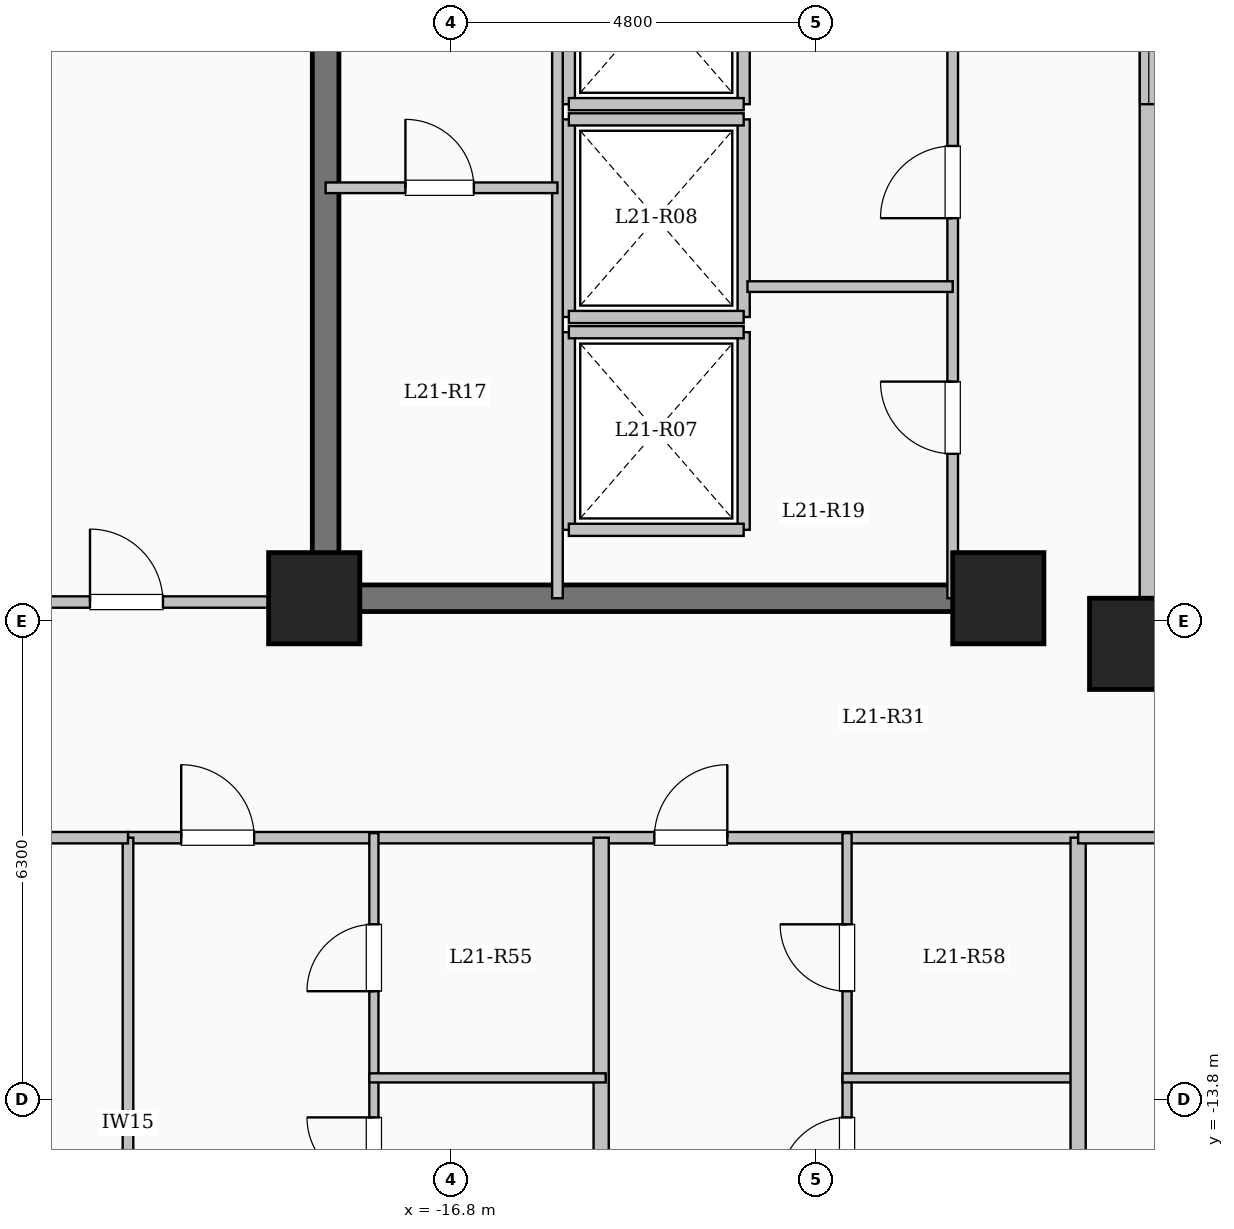
"""IFC4 building model, lengths in metres.
Left out: names, types, materials, properties, quantities, classifications, styles, units other than length and angle.
Written with IfcOpenShell. Run it as: python <this file> out.ifc"""

import sys

from ifc_helpers import new_model, si_unit, direction, frame, frame_2d, origin, origin_2d, place, context, subcontext, project, spatial, rectangle, extrude, element, fill, save


model = new_model("IFC4")
c1 = context("Model", 3, precision=1e-05, world=origin(), true_north=direction((0.0, 1.0)))
c2 = subcontext(c1, "Body", "Model", "MODEL_VIEW")
j1 = project(units=[si_unit("LENGTHUNIT", "METRE"), si_unit("PLANEANGLEUNIT", "RADIAN")], contexts=[c1])
p1 = place(None, origin())
s1 = spatial("IfcSite", under=j1, at=p1, CompositionType="ELEMENT")
p2 = place(p1, origin())
s2 = spatial("IfcBuilding", under=s1, at=p2, CompositionType="ELEMENT")
p3 = place(p2, frame((0.0, 0.0, 81.65)))
s3 = spatial("IfcBuildingStorey", under=s2, at=p3, CompositionType="ELEMENT", Elevation=81.65)
for number, where, z_axis, x_axis in (
    (1, (-7.8, -7.8, 0.0), (0.0, 0.0, 1.0), (1.0, 0.0, 0.0)),
    (2, (-9.6, -7.2, 0.0), (0.0, 0.0, 1.0), (1.0, 0.0, 0.0)),
    (3, (-18.6, -7.2, 0.0), (0.0, 0.0, 1.0), (1.0, 0.0, 0.0)),
):
    element("IfcColumn", number, at=place(p3, frame(where, z_axis=z_axis, x_axis=x_axis)), inside=s3, PredefinedType="COLUMN", context=c2, shape_type="SweptSolid", body=[
        extrude(rectangle(XDim=1.2, YDim=1.2, at=origin_2d()), origin(), (0.0, 0.0, 1.0), 3.35),
    ])
p4 = place(p3, frame((-7.62, -7.62, 0.0), z_axis=(0.0, 0.0, 1.0), x_axis=(1.0, 0.0, 0.0)))
e4 = element("IfcWall", 4, at=p4, inside=s3, PredefinedType="SOLIDWALL", context=c2, shape_type="SweptSolid", body=[
    extrude(rectangle(XDim=15.24, YDim=0.24, at=frame_2d((7.62, 0.0))), origin(), (0.0, 0.0, 1.0), 3.1),
])
p5 = place(p4, frame((6.92, 0.0, 0.95)))
e5 = element("IfcOpeningElement", 5, at=p5, cuts=e4, PredefinedType="OPENING", context=c2, shape_type="SweptSolid", body=[
    extrude(rectangle(XDim=1.4, YDim=1.5, at=frame_2d((0.7, 0.75))), frame((0.0, 0.13, 0.0), z_axis=(0.0, -1.0, 0.0), x_axis=(1.0, 0.0, 0.0)), (0.0, 0.0, 1.0), 0.26),
])
p6 = place(p3, frame((-7.62, 7.62, 0.0), z_axis=(0.0, 0.0, 1.0), x_axis=(0.0, -1.0, 0.0)))
e6 = element("IfcWall", 6, at=p6, inside=s3, PredefinedType="SOLIDWALL", context=c2, shape_type="SweptSolid", body=[
    extrude(rectangle(XDim=15.24, YDim=0.24, at=frame_2d((7.62, 0.0))), origin(), (0.0, 0.0, 1.0), 3.1),
])
p7 = place(p6, frame((6.92, 0.0, 0.95)))
e7 = element("IfcOpeningElement", 7, at=p7, cuts=e6, PredefinedType="OPENING", context=c2, shape_type="SweptSolid", body=[
    extrude(rectangle(XDim=1.4, YDim=1.5, at=frame_2d((0.7, 0.75))), frame((0.0, 0.13, 0.0), z_axis=(0.0, -1.0, 0.0), x_axis=(1.0, 0.0, 0.0)), (0.0, 0.0, 1.0), 0.26),
])
for number, where, z_axis, x_axis in (
    (8, (-15.25, -6.3, 0.0), (0.0, 0.0, 1.0), (0.0, 1.0, 0.0)),
    (9, (-12.95, -6.3, 0.0), (0.0, 0.0, 1.0), (0.0, 1.0, 0.0)),
):
    element("IfcWall", number, at=place(p3, frame(where, z_axis=z_axis, x_axis=x_axis)), inside=s3, PredefinedType="SOLIDWALL", context=c2, shape_type="SweptSolid", body=[
        extrude(rectangle(XDim=2.6, YDim=0.16, at=frame_2d((1.3, 0.0))), origin(), (0.0, 0.0, 1.0), 3.1),
    ])
for number, where, z_axis, x_axis in (
    (10, (-15.25, -6.3, 0.0), (0.0, 0.0, 1.0), (1.0, 0.0, 0.0)),
    (11, (-15.25, -3.7, 0.0), (0.0, 0.0, 1.0), (1.0, 0.0, 0.0)),
):
    element("IfcWall", number, at=place(p3, frame(where, z_axis=z_axis, x_axis=x_axis)), inside=s3, PredefinedType="SOLIDWALL", context=c2, shape_type="SweptSolid", body=[
        extrude(rectangle(XDim=2.3, YDim=0.16, at=frame_2d((1.15, 0.0))), origin(), (0.0, 0.0, 1.0), 3.1),
    ])
for number, where, z_axis, x_axis in (
    (12, (-15.25, -3.5, 0.0), (0.0, 0.0, 1.0), (0.0, 1.0, 0.0)),
    (13, (-12.95, -3.5, 0.0), (0.0, 0.0, 1.0), (0.0, 1.0, 0.0)),
):
    element("IfcWall", number, at=place(p3, frame(where, z_axis=z_axis, x_axis=x_axis)), inside=s3, PredefinedType="SOLIDWALL", context=c2, shape_type="SweptSolid", body=[
        extrude(rectangle(XDim=2.6, YDim=0.16, at=frame_2d((1.3, 0.0))), origin(), (0.0, 0.0, 1.0), 3.1),
    ])
for number, where, z_axis, x_axis in (
    (14, (-15.25, -3.5, 0.0), (0.0, 0.0, 1.0), (1.0, 0.0, 0.0)),
    (15, (-15.25, -0.9, 0.0), (0.0, 0.0, 1.0), (1.0, 0.0, 0.0)),
):
    element("IfcWall", number, at=place(p3, frame(where, z_axis=z_axis, x_axis=x_axis)), inside=s3, PredefinedType="SOLIDWALL", context=c2, shape_type="SweptSolid", body=[
        extrude(rectangle(XDim=2.3, YDim=0.16, at=frame_2d((1.15, 0.0))), origin(), (0.0, 0.0, 1.0), 3.1),
    ])
for number, where, z_axis, x_axis in (
    (16, (-15.25, -0.7, 0.0), (0.0, 0.0, 1.0), (0.0, 1.0, 0.0)),
    (17, (-12.95, -0.7, 0.0), (0.0, 0.0, 1.0), (0.0, 1.0, 0.0)),
):
    element("IfcWall", number, at=place(p3, frame(where, z_axis=z_axis, x_axis=x_axis)), inside=s3, PredefinedType="SOLIDWALL", context=c2, shape_type="SweptSolid", body=[
        extrude(rectangle(XDim=2.6, YDim=0.16, at=frame_2d((1.3, 0.0))), origin(), (0.0, 0.0, 1.0), 3.1),
    ])
p8 = place(p3, frame((-15.25, -0.7, 0.0), z_axis=(0.0, 0.0, 1.0), x_axis=(1.0, 0.0, 0.0)))
e18 = element("IfcWall", 18, at=p8, inside=s3, PredefinedType="SOLIDWALL", context=c2, shape_type="SweptSolid", body=[
    extrude(rectangle(XDim=2.3, YDim=0.16, at=frame_2d((1.15, 0.0))), origin(), (0.0, 0.0, 1.0), 3.1),
])
p9 = place(p3, frame((-18.45, -7.375, 0.0), z_axis=(0.0, 0.0, 1.0), x_axis=(0.0, 1.0, 0.0)))
e19 = element("IfcWall", 19, at=p9, inside=s3, PredefinedType="SHEAR", context=c2, shape_type="SweptSolid", body=[
    extrude(rectangle(XDim=14.05, YDim=0.35, at=frame_2d((7.025, 0.0))), origin(), (0.0, 0.0, 1.0), 3.35),
])
p10 = place(p3, frame((-18.625, -7.2, 0.0), z_axis=(0.0, 0.0, 1.0), x_axis=(1.0, 0.0, 0.0)))
e20 = element("IfcWall", 20, at=p10, inside=s3, PredefinedType="SHEAR", context=c2, shape_type="SweptSolid", body=[
    extrude(rectangle(XDim=8.55, YDim=0.35, at=frame_2d((4.275, 0.0))), origin(), (0.0, 0.0, 1.0), 3.35),
])
p11 = place(p3, frame((-15.4, -7.2, 0.0), z_axis=(0.0, 0.0, 1.0), x_axis=(0.0, 1.0, 0.0)))
e21 = element("IfcWall", 21, at=p11, inside=s3, PredefinedType="PARTITIONING", context=c2, shape_type="SweptSolid", body=[
    extrude(rectangle(XDim=10.45, YDim=0.14, at=frame_2d((5.225, 0.0))), origin(), (0.0, 0.0, 1.0), 3.1),
])
p12 = place(p11, frame((9.25, 0.0, 0.0)))
e22 = element("IfcOpeningElement", 22, at=p12, cuts=e21, PredefinedType="OPENING", context=c2, shape_type="SweptSolid", body=[
    extrude(rectangle(XDim=0.9, YDim=2.08, at=frame_2d((0.45, 1.04))), frame((0.0, 0.08, 0.0), z_axis=(0.0, -1.0, 0.0), x_axis=(1.0, 0.0, 0.0)), (0.0, 0.0, 1.0), 0.16),
])
p13 = place(p3, frame((-18.45, -1.8, 0.0), z_axis=(0.0, 0.0, 1.0), x_axis=(1.0, 0.0, 0.0)))
e23 = element("IfcWall", 23, at=p13, inside=s3, PredefinedType="PARTITIONING", context=c2, shape_type="SweptSolid", body=[
    extrude(rectangle(XDim=3.05, YDim=0.14, at=frame_2d((1.525, 0.0))), origin(), (0.0, 0.0, 1.0), 3.1),
])
p14 = place(p13, frame((1.05, 0.0, 0.0)))
e24 = element("IfcOpeningElement", 24, at=p14, cuts=e23, PredefinedType="OPENING", context=c2, shape_type="SweptSolid", body=[
    extrude(rectangle(XDim=0.9, YDim=2.08, at=frame_2d((0.45, 1.04))), frame((0.0, 0.08, 0.0), z_axis=(0.0, -1.0, 0.0), x_axis=(1.0, 0.0, 0.0)), (0.0, 0.0, 1.0), 0.16),
])
p15 = place(p3, frame((-10.2, -7.2, 0.0), z_axis=(0.0, 0.0, 1.0), x_axis=(0.0, 1.0, 0.0)))
e25 = element("IfcWall", 25, at=p15, inside=s3, PredefinedType="PARTITIONING", context=c2, shape_type="SweptSolid", body=[
    extrude(rectangle(XDim=9.12, YDim=0.14, at=frame_2d((4.56, 0.0))), origin(), (0.0, 0.0, 1.0), 3.1),
])
p16 = place(p15, frame((1.9, 0.0, 0.0)))
e26 = element("IfcOpeningElement", 26, at=p16, cuts=e25, PredefinedType="OPENING", context=c2, shape_type="SweptSolid", body=[
    extrude(rectangle(XDim=0.95, YDim=2.12, at=frame_2d((0.475, 1.06))), frame((0.0, 0.08, 0.0), z_axis=(0.0, -1.0, 0.0), x_axis=(1.0, 0.0, 0.0)), (0.0, 0.0, 1.0), 0.16),
])
p17 = place(p15, frame((5.0, 0.0, 0.0)))
e27 = element("IfcOpeningElement", 27, at=p17, cuts=e25, PredefinedType="OPENING", context=c2, shape_type="SweptSolid", body=[
    extrude(rectangle(XDim=0.95, YDim=2.12, at=frame_2d((0.475, 1.06))), frame((0.0, 0.08, 0.0), z_axis=(0.0, -1.0, 0.0), x_axis=(1.0, 0.0, 0.0)), (0.0, 0.0, 1.0), 0.16),
])
p18 = place(p3, frame((-12.9, -3.1, 0.0), z_axis=(0.0, 0.0, 1.0), x_axis=(1.0, 0.0, 0.0)))
e28 = element("IfcWall", 28, at=p18, inside=s3, PredefinedType="PARTITIONING", context=c2, shape_type="SweptSolid", body=[
    extrude(rectangle(XDim=2.7, YDim=0.14, at=frame_2d((1.35, 0.0))), origin(), (0.0, 0.0, 1.0), 3.1),
])
p19 = place(p3, frame((-21.05, -10.35, 0.0), z_axis=(0.0, 0.0, 1.0), x_axis=(1.0, 0.0, 0.0)))
e29 = element("IfcWall", 29, at=p19, inside=s3, PredefinedType="PARTITIONING", context=c2, shape_type="SweptSolid", body=[
    extrude(rectangle(XDim=12.5, YDim=0.15, at=frame_2d((6.25, 0.0))), origin(), (0.0, 0.0, 1.0), 3.1),
])
p20 = place(p19, frame((0.7, 0.0, 0.0)))
e30 = element("IfcOpeningElement", 30, at=p20, cuts=e29, PredefinedType="OPENING", context=c2, shape_type="SweptSolid", body=[
    extrude(rectangle(XDim=0.96, YDim=2.15, at=frame_2d((0.48, 1.075))), frame((0.0, 0.085, 0.0), z_axis=(0.0, -1.0, 0.0), x_axis=(1.0, 0.0, 0.0)), (0.0, 0.0, 1.0), 0.17),
])
p21 = place(p19, frame((6.925, 0.0, 0.0)))
e31 = element("IfcOpeningElement", 31, at=p21, cuts=e29, PredefinedType="OPENING", context=c2, shape_type="SweptSolid", body=[
    extrude(rectangle(XDim=0.96, YDim=2.15, at=frame_2d((0.48, 1.075))), frame((0.0, 0.085, 0.0), z_axis=(0.0, -1.0, 0.0), x_axis=(1.0, 0.0, 0.0)), (0.0, 0.0, 1.0), 0.17),
])
p22 = place(p3, frame((-14.825, -22.1, 0.0), z_axis=(0.0, 0.0, 1.0), x_axis=(0.0, 1.0, 0.0)))
e32 = element("IfcWall", 32, at=p22, inside=s3, PredefinedType="SOLIDWALL", context=c2, shape_type="SweptSolid", body=[
    extrude(rectangle(XDim=11.75, YDim=0.2, at=frame_2d((5.875, 0.0))), origin(), (0.0, 0.0, 1.0), 2.435),
])
p23 = place(p3, frame((-17.815, -22.1, 0.0), z_axis=(0.0, 0.0, 1.0), x_axis=(0.0, 1.0, 0.0)))
e33 = element("IfcWall", 33, at=p23, inside=s3, PredefinedType="PARTITIONING", context=c2, shape_type="SweptSolid", body=[
    extrude(rectangle(XDim=8.59, YDim=0.12, at=frame_2d((4.295, 0.0))), origin(), (0.0, 0.0, 1.0), 3.1),
])
p24 = place(p23, frame((7.19, 0.0, 0.0)))
e34 = element("IfcOpeningElement", 34, at=p24, cuts=e33, PredefinedType="OPENING", context=c2, shape_type="SweptSolid", body=[
    extrude(rectangle(XDim=0.88, YDim=2.1, at=frame_2d((0.44, 1.05))), frame((0.0, 0.07, 0.0), z_axis=(0.0, -1.0, 0.0), x_axis=(1.0, 0.0, 0.0)), (0.0, 0.0, 1.0), 0.14),
])
p25 = place(p3, frame((-17.815, -13.51, 0.0), z_axis=(0.0, 0.0, 1.0), x_axis=(0.0, 1.0, 0.0)))
e35 = element("IfcWall", 35, at=p25, inside=s3, PredefinedType="PARTITIONING", context=c2, shape_type="SweptSolid", body=[
    extrude(rectangle(XDim=3.22, YDim=0.12, at=frame_2d((1.61, 0.0))), origin(), (0.0, 0.0, 1.0), 3.1),
])
p26 = place(p25, frame((1.14, 0.0, 0.0)))
e36 = element("IfcOpeningElement", 36, at=p26, cuts=e35, PredefinedType="OPENING", context=c2, shape_type="SweptSolid", body=[
    extrude(rectangle(XDim=0.88, YDim=2.1, at=frame_2d((0.44, 1.05))), frame((0.0, 0.07, 0.0), z_axis=(0.0, -1.0, 0.0), x_axis=(1.0, 0.0, 0.0)), (0.0, 0.0, 1.0), 0.14),
])
p27 = place(p3, frame((-17.875, -13.51, 0.0), z_axis=(0.0, 0.0, 1.0), x_axis=(1.0, 0.0, 0.0)))
e37 = element("IfcWall", 37, at=p27, inside=s3, PredefinedType="PARTITIONING", context=c2, shape_type="SweptSolid", body=[
    extrude(rectangle(XDim=3.11, YDim=0.12, at=frame_2d((1.555, 0.0))), origin(), (0.0, 0.0, 1.0), 3.1),
])
p28 = place(p3, frame((-11.59, -22.1, 0.0), z_axis=(0.0, 0.0, 1.0), x_axis=(0.0, 1.0, 0.0)))
e38 = element("IfcWall", 38, at=p28, inside=s3, PredefinedType="PARTITIONING", context=c2, shape_type="SweptSolid", body=[
    extrude(rectangle(XDim=8.59, YDim=0.12, at=frame_2d((4.295, 0.0))), origin(), (0.0, 0.0, 1.0), 3.1),
])
p29 = place(p28, frame((7.19, 0.0, 0.0)))
e39 = element("IfcOpeningElement", 39, at=p29, cuts=e38, PredefinedType="OPENING", context=c2, shape_type="SweptSolid", body=[
    extrude(rectangle(XDim=0.88, YDim=2.1, at=frame_2d((0.44, 1.05))), frame((0.0, 0.07, 0.0), z_axis=(0.0, -1.0, 0.0), x_axis=(1.0, 0.0, 0.0)), (0.0, 0.0, 1.0), 0.14),
])
p30 = place(p3, frame((-11.59, -13.51, 0.0), z_axis=(0.0, 0.0, 1.0), x_axis=(0.0, 1.0, 0.0)))
e40 = element("IfcWall", 40, at=p30, inside=s3, PredefinedType="PARTITIONING", context=c2, shape_type="SweptSolid", body=[
    extrude(rectangle(XDim=3.22, YDim=0.12, at=frame_2d((1.61, 0.0))), origin(), (0.0, 0.0, 1.0), 3.1),
])
p31 = place(p30, frame((1.14, 0.0, 0.0)))
e41 = element("IfcOpeningElement", 41, at=p31, cuts=e40, PredefinedType="OPENING", context=c2, shape_type="SweptSolid", body=[
    extrude(rectangle(XDim=0.88, YDim=2.1, at=frame_2d((0.44, 1.05))), frame((0.0, 0.07, 0.0), z_axis=(0.0, -1.0, 0.0), x_axis=(1.0, 0.0, 0.0)), (0.0, 0.0, 1.0), 0.14),
])
p32 = place(p3, frame((-11.65, -13.51, 0.0), z_axis=(0.0, 0.0, 1.0), x_axis=(1.0, 0.0, 0.0)))
e42 = element("IfcWall", 42, at=p32, inside=s3, PredefinedType="PARTITIONING", context=c2, shape_type="SweptSolid", body=[
    extrude(rectangle(XDim=3.11, YDim=0.12, at=frame_2d((1.555, 0.0))), origin(), (0.0, 0.0, 1.0), 3.1),
])
p33 = place(p3, frame((-8.55, -22.704, 0.0), z_axis=(0.0, 0.0, 1.0), x_axis=(0.0, 1.0, 0.0)))
e43 = element("IfcWall", 43, at=p33, inside=s3, PredefinedType="SOLIDWALL", context=c2, shape_type="SweptSolid", body=[
    extrude(rectangle(XDim=12.354, YDim=0.2, at=frame_2d((6.177, 0.0))), origin(), (0.0, 0.0, 1.0), 3.1),
])
p34 = place(p3, frame((-8.55, -10.35, 0.0), z_axis=(0.0, 0.0, 1.0), x_axis=(1.0, 0.0, 0.0)))
e44 = element("IfcWall", 44, at=p34, inside=s3, PredefinedType="PARTITIONING", context=c2, shape_type="SweptSolid", body=[
    extrude(rectangle(XDim=17.1, YDim=0.15, at=frame_2d((8.55, 0.0))), origin(), (0.0, 0.0, 1.0), 3.1),
])
p35 = place(p34, frame((1.6, 0.0, 0.0)))
e45 = element("IfcOpeningElement", 45, at=p35, cuts=e44, PredefinedType="OPENING", context=c2, shape_type="SweptSolid", body=[
    extrude(rectangle(XDim=0.96, YDim=2.15, at=frame_2d((0.48, 1.075))), frame((0.0, 0.085, 0.0), z_axis=(0.0, -1.0, 0.0), x_axis=(1.0, 0.0, 0.0)), (0.0, 0.0, 1.0), 0.17),
])
p36 = place(p3, frame((-26.88, -7.25, 0.0), z_axis=(0.0, 0.0, 1.0), x_axis=(1.0, 0.0, 0.0)))
e46 = element("IfcWall", 46, at=p36, inside=s3, PredefinedType="PARTITIONING", context=c2, shape_type="SweptSolid", body=[
    extrude(rectangle(XDim=8.43, YDim=0.15, at=frame_2d((4.215, 0.0))), origin(), (0.0, 0.0, 1.0), 3.1),
])
p37 = place(p36, frame((5.33, 0.0, 0.0)))
e47 = element("IfcOpeningElement", 47, at=p37, cuts=e46, PredefinedType="OPENING", context=c2, shape_type="SweptSolid", body=[
    extrude(rectangle(XDim=0.96, YDim=2.15, at=frame_2d((0.48, 1.075))), frame((0.0, 0.085, 0.0), z_axis=(0.0, -1.0, 0.0), x_axis=(1.0, 0.0, 0.0)), (0.0, 0.0, 1.0), 0.17),
])
p38 = place(p3, frame((-21.05, -17.85, 0.0), z_axis=(0.0, 0.0, 1.0), x_axis=(0.0, 1.0, 0.0)))
e48 = element("IfcWall", 48, at=p38, inside=s3, PredefinedType="PARTITIONING", context=c2, shape_type="SweptSolid", body=[
    extrude(rectangle(XDim=7.5, YDim=0.14, at=frame_2d((3.75, 0.0))), origin(), (0.0, 0.0, 1.0), 3.1),
])
p39 = place(p3, frame((-26.88, -10.35, 0.0), z_axis=(0.0, 0.0, 1.0), x_axis=(1.0, 0.0, 0.0)))
e49 = element("IfcWall", 49, at=p39, inside=s3, PredefinedType="PARTITIONING", context=c2, shape_type="SweptSolid", body=[
    extrude(rectangle(XDim=5.83, YDim=0.15, at=frame_2d((2.915, 0.0))), origin(), (0.0, 0.0, 1.0), 3.1),
])
p40 = place(p39, frame((2.44, 0.0, 0.0)))
e50 = element("IfcOpeningElement", 50, at=p40, cuts=e49, PredefinedType="OPENING", context=c2, shape_type="SweptSolid", body=[
    extrude(rectangle(XDim=0.95, YDim=2.15, at=frame_2d((0.475, 1.075))), frame((0.0, 0.085, 0.0), z_axis=(0.0, -1.0, 0.0), x_axis=(1.0, 0.0, 0.0)), (0.0, 0.0, 1.0), 0.17),
])
p41 = place(p7, origin())
e51 = element("IfcWindow", 51, at=p41, inside=s3, PartitioningType="SINGLE_PANEL", PredefinedType="WINDOW", context=c2, shape_type="SweptSolid", body=[
    extrude(rectangle(XDim=1.4, YDim=1.5, at=frame_2d((0.7, 0.75))), frame((0.0, 0.03, 0.0), z_axis=(0.0, -1.0, 0.0), x_axis=(1.0, 0.0, 0.0)), (0.0, 0.0, 1.0), 0.06),
])
fill(e7, e51)
p42 = place(p14, origin())
e52 = element("IfcDoor", 52, at=p42, inside=s3, OperationType="SINGLE_SWING_LEFT", PredefinedType="DOOR", context=c2, shape_type="SweptSolid", body=[
    extrude(rectangle(XDim=0.9, YDim=2.08, at=frame_2d((0.45, 1.04))), frame((0.0, 0.025, 0.0), z_axis=(0.0, -1.0, 0.0), x_axis=(1.0, 0.0, 0.0)), (0.0, 0.0, 1.0), 0.05),
])
fill(e24, e52)
p43 = place(p16, origin())
e53 = element("IfcDoor", 53, at=p43, inside=s3, OperationType="SINGLE_SWING_RIGHT", PredefinedType="DOOR", context=c2, shape_type="SweptSolid", body=[
    extrude(rectangle(XDim=0.95, YDim=2.12, at=frame_2d((0.475, 1.06))), frame((0.0, 0.025, 0.0), z_axis=(0.0, -1.0, 0.0), x_axis=(1.0, 0.0, 0.0)), (0.0, 0.0, 1.0), 0.05),
])
fill(e26, e53)
p44 = place(p17, origin())
e54 = element("IfcDoor", 54, at=p44, inside=s3, OperationType="SINGLE_SWING_LEFT", PredefinedType="DOOR", context=c2, shape_type="SweptSolid", body=[
    extrude(rectangle(XDim=0.95, YDim=2.12, at=frame_2d((0.475, 1.06))), frame((0.0, 0.025, 0.0), z_axis=(0.0, -1.0, 0.0), x_axis=(1.0, 0.0, 0.0)), (0.0, 0.0, 1.0), 0.05),
])
fill(e27, e54)
p45 = place(p20, origin())
e55 = element("IfcDoor", 55, at=p45, inside=s3, OperationType="SINGLE_SWING_LEFT", PredefinedType="DOOR", context=c2, shape_type="SweptSolid", body=[
    extrude(rectangle(XDim=0.96, YDim=2.15, at=frame_2d((0.48, 1.075))), frame((0.0, 0.025, 0.0), z_axis=(0.0, -1.0, 0.0), x_axis=(1.0, 0.0, 0.0)), (0.0, 0.0, 1.0), 0.05),
])
fill(e30, e55)
p46 = place(p24, origin())
e56 = element("IfcDoor", 56, at=p46, inside=s3, OperationType="SINGLE_SWING_RIGHT", PredefinedType="DOOR", context=c2, shape_type="SweptSolid", body=[
    extrude(rectangle(XDim=0.88, YDim=2.1, at=frame_2d((0.44, 1.05))), frame((0.0, 0.025, 0.0), z_axis=(0.0, -1.0, 0.0), x_axis=(1.0, 0.0, 0.0)), (0.0, 0.0, 1.0), 0.05),
])
fill(e34, e56)
p47 = place(p26, origin())
e57 = element("IfcDoor", 57, at=p47, inside=s3, OperationType="SINGLE_SWING_LEFT", PredefinedType="DOOR", context=c2, shape_type="SweptSolid", body=[
    extrude(rectangle(XDim=0.88, YDim=2.1, at=frame_2d((0.44, 1.05))), frame((0.0, 0.025, 0.0), z_axis=(0.0, -1.0, 0.0), x_axis=(1.0, 0.0, 0.0)), (0.0, 0.0, 1.0), 0.05),
])
fill(e36, e57)
p48 = place(p21, origin())
e58 = element("IfcDoor", 58, at=p48, inside=s3, OperationType="SINGLE_SWING_RIGHT", PredefinedType="DOOR", context=c2, shape_type="SweptSolid", body=[
    extrude(rectangle(XDim=0.96, YDim=2.15, at=frame_2d((0.48, 1.075))), frame((0.0, 0.025, 0.0), z_axis=(0.0, -1.0, 0.0), x_axis=(1.0, 0.0, 0.0)), (0.0, 0.0, 1.0), 0.05),
])
fill(e31, e58)
p49 = place(p29, origin())
e59 = element("IfcDoor", 59, at=p49, inside=s3, OperationType="SINGLE_SWING_LEFT", PredefinedType="DOOR", context=c2, shape_type="SweptSolid", body=[
    extrude(rectangle(XDim=0.88, YDim=2.1, at=frame_2d((0.44, 1.05))), frame((0.0, 0.025, 0.0), z_axis=(0.0, -1.0, 0.0), x_axis=(1.0, 0.0, 0.0)), (0.0, 0.0, 1.0), 0.05),
])
fill(e39, e59)
p50 = place(p31, origin())
e60 = element("IfcDoor", 60, at=p50, inside=s3, OperationType="SINGLE_SWING_RIGHT", PredefinedType="DOOR", context=c2, shape_type="SweptSolid", body=[
    extrude(rectangle(XDim=0.88, YDim=2.1, at=frame_2d((0.44, 1.05))), frame((0.0, 0.025, 0.0), z_axis=(0.0, -1.0, 0.0), x_axis=(1.0, 0.0, 0.0)), (0.0, 0.0, 1.0), 0.05),
])
fill(e41, e60)
p51 = place(p37, origin())
e61 = element("IfcDoor", 61, at=p51, inside=s3, OperationType="SINGLE_SWING_LEFT", PredefinedType="DOOR", context=c2, shape_type="SweptSolid", body=[
    extrude(rectangle(XDim=0.96, YDim=2.15, at=frame_2d((0.48, 1.075))), frame((0.0, 0.025, 0.0), z_axis=(0.0, -1.0, 0.0), x_axis=(1.0, 0.0, 0.0)), (0.0, 0.0, 1.0), 0.05),
])
fill(e47, e61)
save(model, sys.argv[1])
